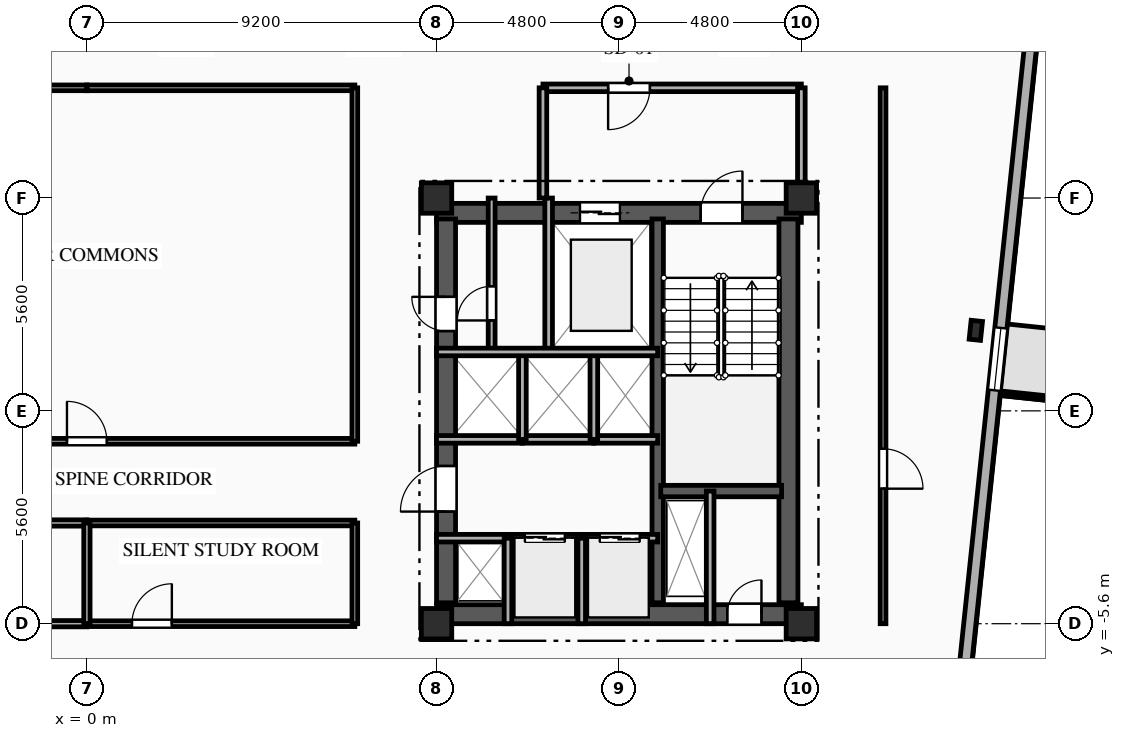
"""IFC4 building model, lengths in metres.
Left out: names, types, materials, properties, quantities, classifications, styles, units other than length and angle.
Written with IfcOpenShell. Run it as: python <this file> out.ifc"""

import sys

from ifc_helpers import new_model, si_unit, direction, frame, frame_2d, origin, origin_2d, place, context, subcontext, project, spatial, rectangle, i_section, extrude, element, fill, save


model = new_model("IFC4")
c1 = context("Model", 3, precision=1e-05, world=origin(), true_north=direction((0.0, 1.0)))
c2 = subcontext(c1, "Body", "Model", "MODEL_VIEW")
j1 = project(units=[si_unit("LENGTHUNIT", "METRE"), si_unit("PLANEANGLEUNIT", "RADIAN")], contexts=[c1])
p1 = place(None, origin())
s1 = spatial("IfcSite", under=j1, at=p1, CompositionType="ELEMENT")
p2 = place(p1, origin())
s2 = spatial("IfcBuilding", under=s1, at=p2, CompositionType="ELEMENT")
p3 = place(p2, frame((0.0, 0.0, 183.0)))
s3 = spatial("IfcBuildingStorey", under=s2, at=p3, CompositionType="ELEMENT", Elevation=183.0)
for number, where, z_axis, x_axis in (
    (1, (9.2, -5.6, 0.0), (0.0, 0.0, 1.0), (1.0, 0.0, 0.0)),
    (2, (9.2, 5.6, 0.0), (0.0, 0.0, 1.0), (1.0, 0.0, 0.0)),
    (3, (18.8, -5.6, 0.0), (0.0, 0.0, 1.0), (1.0, 0.0, 0.0)),
    (4, (18.8, 5.6, 0.0), (0.0, 0.0, 1.0), (1.0, 0.0, 0.0)),
):
    element("IfcColumn", number, at=place(p3, frame(where, z_axis=z_axis, x_axis=x_axis)), inside=s3, PredefinedType="COLUMN", context=c2, shape_type="SweptSolid", body=[
        extrude(rectangle(XDim=0.8, YDim=0.8, at=origin_2d()), origin(), (0.0, 0.0, 1.0), 3.35),
    ])
p4 = place(p3, frame((23.391, 2.119, 0.0), z_axis=(0.0, 0.0, 1.0), x_axis=(0.994521895368, -0.104528463268, 0.0)))
e5 = element("IfcColumn", 5, at=p4, inside=s3, PredefinedType="COLUMN", context=c2, shape_type="SweptSolid", body=[
    extrude(i_section(OverallWidth=0.3, OverallDepth=0.5, WebThickness=0.014, FlangeThickness=0.028, FilletRadius=0.027, at=origin_2d()), origin(), (0.0, 0.0, 1.0), 3.35),
])
p5 = place(p3, frame((25.063, 11.814, 0.0), z_axis=(0.0, 0.0, 1.0), x_axis=(-0.104523275986, -0.99452244056, 0.0)))
e6 = element("IfcWall", 6, at=p5, inside=s3, PredefinedType="SOLIDWALL", context=c2, shape_type="SweptSolid", body=[
    extrude(rectangle(XDim=28.8, YDim=0.32, at=frame_2d((14.4, 0.0))), origin(), (0.0, 0.0, 1.0), 3.04),
])
p6 = place(p5, frame((9.684, 0.0, 0.85)))
e7 = element("IfcOpeningElement", 7, at=p6, cuts=e6, PredefinedType="OPENING", context=c2, shape_type="SweptSolid", body=[
    extrude(rectangle(XDim=1.65, YDim=1.85, at=frame_2d((0.825, 0.925))), frame((0.0, 0.17, 0.0), z_axis=(0.0, -1.0, 0.0), x_axis=(1.0, 0.0, 0.0)), (0.0, 0.0, 1.0), 0.34),
])
p7 = place(p3, frame((9.2, 5.21, 0.0), z_axis=(0.0, 0.0, 1.0), x_axis=(1.0, 0.0, 0.0)))
e8 = element("IfcWall", 8, at=p7, inside=s3, PredefinedType="SHEAR", context=c2, shape_type="SweptSolid", body=[
    extrude(rectangle(XDim=9.6, YDim=0.5, at=frame_2d((4.8, 0.0))), origin(), (0.0, 0.0, 1.0), 3.04),
])
p8 = place(p7, frame((6.95, 0.0, 0.0)))
e9 = element("IfcOpeningElement", 9, at=p8, cuts=e8, PredefinedType="OPENING", context=c2, shape_type="SweptSolid", body=[
    extrude(rectangle(XDim=1.1, YDim=2.15, at=frame_2d((0.55, 1.075))), frame((0.0, 0.26, 0.0), z_axis=(0.0, -1.0, 0.0), x_axis=(1.0, 0.0, 0.0)), (0.0, 0.0, 1.0), 0.52),
])
p9 = place(p7, frame((3.775, 0.0, 0.0)))
e10 = element("IfcOpeningElement", 10, at=p9, cuts=e8, PredefinedType="OPENING", context=c2, shape_type="SweptSolid", body=[
    extrude(rectangle(XDim=1.05, YDim=2.1, at=frame_2d((0.525, 1.05))), frame((0.0, 0.26, 0.0), z_axis=(0.0, -1.0, 0.0), x_axis=(1.0, 0.0, 0.0)), (0.0, 0.0, 1.0), 0.52),
])
p10 = place(p3, frame((9.2, -5.35, 0.0), z_axis=(0.0, 0.0, 1.0), x_axis=(1.0, 0.0, 0.0)))
e11 = element("IfcWall", 11, at=p10, inside=s3, PredefinedType="SHEAR", context=c2, shape_type="SweptSolid", body=[
    extrude(rectangle(XDim=9.6, YDim=0.5, at=frame_2d((4.8, 0.0))), origin(), (0.0, 0.0, 1.0), 3.04),
])
p11 = place(p10, frame((7.65, 0.0, 0.0)))
e12 = element("IfcOpeningElement", 12, at=p11, cuts=e11, PredefinedType="OPENING", context=c2, shape_type="SweptSolid", body=[
    extrude(rectangle(XDim=0.9, YDim=2.1, at=frame_2d((0.45, 1.05))), frame((0.0, 0.26, 0.0), z_axis=(0.0, -1.0, 0.0), x_axis=(1.0, 0.0, 0.0)), (0.0, 0.0, 1.0), 0.52),
])
p12 = place(p3, frame((9.45, -5.05, 0.0), z_axis=(0.0, 0.0, 1.0), x_axis=(0.0, 1.0, 0.0)))
e13 = element("IfcWall", 13, at=p12, inside=s3, PredefinedType="SHEAR", context=c2, shape_type="SweptSolid", body=[
    extrude(rectangle(XDim=10.1, YDim=0.5, at=frame_2d((5.05, 0.0))), origin(), (0.0, 0.0, 1.0), 3.04),
])
p13 = place(p12, frame((7.15, 0.0, 0.0)))
e14 = element("IfcOpeningElement", 14, at=p13, cuts=e13, PredefinedType="OPENING", context=c2, shape_type="SweptSolid", body=[
    extrude(rectangle(XDim=0.9, YDim=2.1, at=frame_2d((0.45, 1.05))), frame((0.0, 0.26, 0.0), z_axis=(0.0, -1.0, 0.0), x_axis=(1.0, 0.0, 0.0)), (0.0, 0.0, 1.0), 0.52),
])
p14 = place(p12, frame((2.4, 0.0, 0.0)))
e15 = element("IfcOpeningElement", 15, at=p14, cuts=e13, PredefinedType="OPENING", context=c2, shape_type="SweptSolid", body=[
    extrude(rectangle(XDim=1.2, YDim=2.15, at=frame_2d((0.6, 1.075))), frame((0.0, 0.26, 0.0), z_axis=(0.0, -1.0, 0.0), x_axis=(1.0, 0.0, 0.0)), (0.0, 0.0, 1.0), 0.52),
])
p15 = place(p3, frame((18.46, -5.05, 0.0), z_axis=(0.0, 0.0, 1.0), x_axis=(0.0, 1.0, 0.0)))
e16 = element("IfcWall", 16, at=p15, inside=s3, PredefinedType="SHEAR", context=c2, shape_type="SweptSolid", body=[
    extrude(rectangle(XDim=10.1, YDim=0.5, at=frame_2d((5.05, 0.0))), origin(), (0.0, 0.0, 1.0), 3.04),
])
p16 = place(p3, frame((15.02, -5.05, 0.0), z_axis=(0.0, 0.0, 1.0), x_axis=(0.0, 1.0, 0.0)))
e17 = element("IfcWall", 17, at=p16, inside=s3, PredefinedType="SHEAR", context=c2, shape_type="SweptSolid", body=[
    extrude(rectangle(XDim=10.1, YDim=0.3, at=frame_2d((5.05, 0.0))), origin(), (0.0, 0.0, 1.0), 3.04),
])
p17 = place(p3, frame((15.1, -2.11, 0.0), z_axis=(0.0, 0.0, 1.0), x_axis=(1.0, 0.0, 0.0)))
e18 = element("IfcWall", 18, at=p17, inside=s3, PredefinedType="SHEAR", context=c2, shape_type="SweptSolid", body=[
    extrude(rectangle(XDim=3.18, YDim=0.3, at=frame_2d((1.59, 0.0))), origin(), (0.0, 0.0, 1.0), 3.04),
])
p18 = place(p3, frame((16.4, -2.11, 0.0), z_axis=(0.0, 0.0, 1.0), x_axis=(0.0, -1.0, 0.0)))
e19 = element("IfcWall", 19, at=p18, inside=s3, PredefinedType="PARTITIONING", context=c2, shape_type="SweptSolid", body=[
    extrude(rectangle(XDim=3.49, YDim=0.2, at=frame_2d((1.745, 0.0))), origin(), (0.0, 0.0, 1.0), 3.04),
])
p19 = place(p3, frame((12.15, 5.6, 0.0), z_axis=(0.0, 0.0, 1.0), x_axis=(0.0, -1.0, 0.0)))
e20 = element("IfcWall", 20, at=p19, inside=s3, PredefinedType="PARTITIONING", context=c2, shape_type="SweptSolid", body=[
    extrude(rectangle(XDim=4.05, YDim=0.2, at=frame_2d((2.025, 0.0))), origin(), (0.0, 0.0, 1.0), 3.04),
])
p20 = place(p3, frame((18.8, 8.5, 0.0), z_axis=(0.0, 0.0, 1.0), x_axis=(-1.0, 0.0, 0.0)))
e21 = element("IfcWall", 21, at=p20, inside=s3, PredefinedType="PARTITIONING", context=c2, shape_type="SweptSolid", body=[
    extrude(rectangle(XDim=6.8, YDim=0.2, at=frame_2d((3.4, 0.0))), origin(), (0.0, 0.0, 1.0), 3.04),
])
p21 = place(p20, frame((3.985, 0.0, 0.0)))
e22 = element("IfcOpeningElement", 22, at=p21, cuts=e21, PredefinedType="OPENING", context=c2, shape_type="SweptSolid", body=[
    extrude(rectangle(XDim=1.1, YDim=2.15, at=frame_2d((0.55, 1.075))), frame((0.0, 0.11, 0.0), z_axis=(0.0, -1.0, 0.0), x_axis=(1.0, 0.0, 0.0)), (0.0, 0.0, 1.0), 0.22),
])
p22 = place(p3, frame((18.8, 5.6, 0.0), z_axis=(0.0, 0.0, 1.0), x_axis=(0.0, 1.0, 0.0)))
e23 = element("IfcWall", 23, at=p22, inside=s3, PredefinedType="PARTITIONING", context=c2, shape_type="SweptSolid", body=[
    extrude(rectangle(XDim=2.9, YDim=0.2, at=frame_2d((1.45, 0.0))), origin(), (0.0, 0.0, 1.0), 2.665),
])
p23 = place(p3, frame((12.0, 8.5, 0.0), z_axis=(0.0, 0.0, 1.0), x_axis=(0.0, -1.0, 0.0)))
e24 = element("IfcWall", 24, at=p23, inside=s3, PredefinedType="PARTITIONING", context=c2, shape_type="SweptSolid", body=[
    extrude(rectangle(XDim=2.9, YDim=0.2, at=frame_2d((1.45, 0.0))), origin(), (0.0, 0.0, 1.0), 3.04),
])
p24 = place(p3, frame((10.65, 1.55, 0.0), z_axis=(0.0, 0.0, 1.0), x_axis=(0.0, 1.0, 0.0)))
e25 = element("IfcWall", 25, at=p24, inside=s3, PredefinedType="PARTITIONING", context=c2, shape_type="SweptSolid", body=[
    extrude(rectangle(XDim=4.05, YDim=0.18, at=frame_2d((2.025, 0.0))), origin(), (0.0, 0.0, 1.0), 3.04),
])
p25 = place(p24, frame((0.829, 0.0, 0.0)))
e26 = element("IfcOpeningElement", 26, at=p25, cuts=e25, PredefinedType="OPENING", context=c2, shape_type="SweptSolid", body=[
    extrude(rectangle(XDim=0.9, YDim=2.1, at=frame_2d((0.45, 1.05))), frame((0.0, 0.1, 0.0), z_axis=(0.0, -1.0, 0.0), x_axis=(1.0, 0.0, 0.0)), (0.0, 0.0, 1.0), 0.2),
])
p26 = place(p3, frame((9.2, -3.35, 0.0), z_axis=(0.0, 0.0, 1.0), x_axis=(1.0, 0.0, 0.0)))
e27 = element("IfcWall", 27, at=p26, inside=s3, PredefinedType="PARTITIONING", context=c2, shape_type="SweptSolid", body=[
    extrude(rectangle(XDim=1.88, YDim=0.2, at=frame_2d((0.94, 0.0))), origin(), (0.0, 0.0, 1.0), 2.755),
])
p27 = place(p3, frame((11.08, -3.35, 0.0), z_axis=(0.0, 0.0, 1.0), x_axis=(1.0, 0.0, 0.0)))
e28 = element("IfcWall", 28, at=p27, inside=s3, PredefinedType="PARTITIONING", context=c2, shape_type="SweptSolid", body=[
    extrude(rectangle(XDim=1.94, YDim=0.2, at=frame_2d((0.97, 0.0))), origin(), (0.0, 0.0, 1.0), 3.04),
])
p28 = place(p27, frame((0.445, 0.0, 0.0)))
e29 = element("IfcOpeningElement", 29, at=p28, cuts=e28, PredefinedType="OPENING", context=c2, shape_type="SweptSolid", body=[
    extrude(rectangle(XDim=1.05, YDim=2.1, at=frame_2d((0.525, 1.05))), frame((0.0, 0.11, 0.0), z_axis=(0.0, -1.0, 0.0), x_axis=(1.0, 0.0, 0.0)), (0.0, 0.0, 1.0), 0.22),
])
p29 = place(p3, frame((13.02, -3.35, 0.0), z_axis=(0.0, 0.0, 1.0), x_axis=(1.0, 0.0, 0.0)))
e30 = element("IfcWall", 30, at=p29, inside=s3, PredefinedType="PARTITIONING", context=c2, shape_type="SweptSolid", body=[
    extrude(rectangle(XDim=2.0, YDim=0.2, at=frame_2d((1.0, 0.0))), origin(), (0.0, 0.0, 1.0), 3.04),
])
p30 = place(p29, frame((0.475, 0.0, 0.0)))
e31 = element("IfcOpeningElement", 31, at=p30, cuts=e30, PredefinedType="OPENING", context=c2, shape_type="SweptSolid", body=[
    extrude(rectangle(XDim=1.05, YDim=2.1, at=frame_2d((0.525, 1.05))), frame((0.0, 0.11, 0.0), z_axis=(0.0, -1.0, 0.0), x_axis=(1.0, 0.0, 0.0)), (0.0, 0.0, 1.0), 0.22),
])
p31 = place(p3, frame((11.46, -0.75, 0.0), z_axis=(0.0, 0.0, 1.0), x_axis=(-1.0, 0.0, 0.0)))
e32 = element("IfcWall", 32, at=p31, inside=s3, PredefinedType="PARTITIONING", context=c2, shape_type="SweptSolid", body=[
    extrude(rectangle(XDim=2.26, YDim=0.2, at=frame_2d((1.13, 0.0))), origin(), (0.0, 0.0, 1.0), 3.04),
])
p32 = place(p3, frame((13.34, -0.75, 0.0), z_axis=(0.0, 0.0, 1.0), x_axis=(-1.0, 0.0, 0.0)))
e33 = element("IfcWall", 33, at=p32, inside=s3, PredefinedType="PARTITIONING", context=c2, shape_type="SweptSolid", body=[
    extrude(rectangle(XDim=1.88, YDim=0.2, at=frame_2d((0.94, 0.0))), origin(), (0.0, 0.0, 1.0), 3.04),
])
p33 = place(p3, frame((15.02, -0.75, 0.0), z_axis=(0.0, 0.0, 1.0), x_axis=(-1.0, 0.0, 0.0)))
e34 = element("IfcWall", 34, at=p33, inside=s3, PredefinedType="PARTITIONING", context=c2, shape_type="SweptSolid", body=[
    extrude(rectangle(XDim=1.68, YDim=0.2, at=frame_2d((0.84, 0.0))), origin(), (0.0, 0.0, 1.0), 3.04),
])
for number, where, z_axis, x_axis in (
    (35, (11.08, -5.6, 0.0), (0.0, 0.0, 1.0), (0.0, 1.0, 0.0)),
    (36, (13.02, -5.6, 0.0), (0.0, 0.0, 1.0), (0.0, 1.0, 0.0)),
):
    element("IfcWall", number, at=place(p3, frame(where, z_axis=z_axis, x_axis=x_axis)), inside=s3, PredefinedType="PARTITIONING", context=c2, shape_type="SweptSolid", body=[
        extrude(rectangle(XDim=2.25, YDim=0.2, at=frame_2d((1.125, 0.0))), origin(), (0.0, 0.0, 1.0), 3.04),
    ])
for number, where, z_axis, x_axis in (
    (37, (11.46, -0.75, 0.0), (0.0, 0.0, 1.0), (0.0, 1.0, 0.0)),
    (38, (13.34, -0.75, 0.0), (0.0, 0.0, 1.0), (0.0, 1.0, 0.0)),
):
    element("IfcWall", number, at=place(p3, frame(where, z_axis=z_axis, x_axis=x_axis)), inside=s3, PredefinedType="PARTITIONING", context=c2, shape_type="SweptSolid", body=[
        extrude(rectangle(XDim=2.3, YDim=0.2, at=frame_2d((1.15, 0.0))), origin(), (0.0, 0.0, 1.0), 3.04),
    ])
for number, where, z_axis, x_axis in (
    (39, (0.0, 8.5, 0.0), (0.0, 0.0, 1.0), (-1.0, 0.0, 0.0)),
    (40, (7.05, 8.5, 0.0), (0.0, 0.0, 1.0), (-1.0, 0.0, 0.0)),
):
    element("IfcWall", number, at=place(p3, frame(where, z_axis=z_axis, x_axis=x_axis)), inside=s3, PredefinedType="PARTITIONING", context=c2, shape_type="SweptSolid", body=[
        extrude(rectangle(XDim=7.05, YDim=0.15, at=frame_2d((3.525, 0.0))), origin(), (0.0, 0.0, 1.0), 3.04),
    ])
p34 = place(p3, frame((-7.05, -5.6, 0.0), z_axis=(0.0, 0.0, 1.0), x_axis=(1.0, 0.0, 0.0)))
e41 = element("IfcWall", 41, at=p34, inside=s3, PredefinedType="PARTITIONING", context=c2, shape_type="SweptSolid", body=[
    extrude(rectangle(XDim=7.05, YDim=0.165, at=frame_2d((3.525, 0.0))), origin(), (0.0, 0.0, 1.0), 2.525),
])
p35 = place(p34, frame((4.728, 0.0, 0.0)))
e42 = element("IfcOpeningElement", 42, at=p35, cuts=e41, PredefinedType="OPENING", context=c2, shape_type="SweptSolid", body=[
    extrude(rectangle(XDim=1.15, YDim=2.15, at=frame_2d((0.575, 1.075))), frame((0.0, 0.093, 0.0), z_axis=(0.0, -1.0, 0.0), x_axis=(1.0, 0.0, 0.0)), (0.0, 0.0, 1.0), 0.185),
])
p36 = place(p3, frame((0.0, -5.6, 0.0), z_axis=(0.0, 0.0, 1.0), x_axis=(1.0, 0.0, 0.0)))
e43 = element("IfcWall", 43, at=p36, inside=s3, PredefinedType="PARTITIONING", context=c2, shape_type="SweptSolid", body=[
    extrude(rectangle(XDim=7.05, YDim=0.15, at=frame_2d((3.525, 0.0))), origin(), (0.0, 0.0, 1.0), 2.525),
])
p37 = place(p36, frame((1.185, 0.0, 0.0)))
e44 = element("IfcOpeningElement", 44, at=p37, cuts=e43, PredefinedType="OPENING", context=c2, shape_type="SweptSolid", body=[
    extrude(rectangle(XDim=1.05, YDim=2.15, at=frame_2d((0.525, 1.075))), frame((0.0, 0.085, 0.0), z_axis=(0.0, -1.0, 0.0), x_axis=(1.0, 0.0, 0.0)), (0.0, 0.0, 1.0), 0.17),
])
p38 = place(p3, frame((20.95, 8.5, 0.0), z_axis=(0.0, 0.0, 1.0), x_axis=(0.0, -1.0, 0.0)))
e45 = element("IfcWall", 45, at=p38, inside=s3, PredefinedType="PARTITIONING", context=c2, shape_type="SweptSolid", body=[
    extrude(rectangle(XDim=14.1, YDim=0.15, at=frame_2d((7.05, 0.0))), origin(), (0.0, 0.0, 1.0), 2.695),
])
p39 = place(p38, frame((9.498, 0.0, 0.0)))
e46 = element("IfcOpeningElement", 46, at=p39, cuts=e45, PredefinedType="OPENING", context=c2, shape_type="SweptSolid", body=[
    extrude(rectangle(XDim=1.05, YDim=2.15, at=frame_2d((0.525, 1.075))), frame((0.0, 0.085, 0.0), z_axis=(0.0, -1.0, 0.0), x_axis=(1.0, 0.0, 0.0)), (0.0, 0.0, 1.0), 0.17),
])
p40 = place(p3, frame((-7.05, -0.8, 0.0), z_axis=(0.0, 0.0, 1.0), x_axis=(1.0, 0.0, 0.0)))
e47 = element("IfcWall", 47, at=p40, inside=s3, PredefinedType="PARTITIONING", context=c2, shape_type="SweptSolid", body=[
    extrude(rectangle(XDim=14.1, YDim=0.15, at=frame_2d((7.05, 0.0))), origin(), (0.0, 0.0, 1.0), 3.04),
])
p41 = place(p40, frame((6.525, 0.0, 0.0)))
e48 = element("IfcOpeningElement", 48, at=p41, cuts=e47, PredefinedType="OPENING", context=c2, shape_type="SweptSolid", body=[
    extrude(rectangle(XDim=1.05, YDim=2.15, at=frame_2d((0.525, 1.075))), frame((0.0, 0.085, 0.0), z_axis=(0.0, -1.0, 0.0), x_axis=(1.0, 0.0, 0.0)), (0.0, 0.0, 1.0), 0.17),
])
p42 = place(p3, frame((0.0, -2.95, 0.0), z_axis=(0.0, 0.0, 1.0), x_axis=(-1.0, 0.0, 0.0)))
e49 = element("IfcWall", 49, at=p42, inside=s3, PredefinedType="PARTITIONING", context=c2, shape_type="SweptSolid", body=[
    extrude(rectangle(XDim=7.05, YDim=0.165, at=frame_2d((3.525, 0.0))), origin(), (0.0, 0.0, 1.0), 3.04),
])
p43 = place(p3, frame((7.05, -2.95, 0.0), z_axis=(0.0, 0.0, 1.0), x_axis=(-1.0, 0.0, 0.0)))
e50 = element("IfcWall", 50, at=p43, inside=s3, PredefinedType="PARTITIONING", context=c2, shape_type="SweptSolid", body=[
    extrude(rectangle(XDim=7.05, YDim=0.15, at=frame_2d((3.525, 0.0))), origin(), (0.0, 0.0, 1.0), 3.04),
])
p44 = place(p3, frame((7.05, -0.8, 0.0), z_axis=(0.0, 0.0, 1.0), x_axis=(0.0, 1.0, 0.0)))
e51 = element("IfcWall", 51, at=p44, inside=s3, PredefinedType="PARTITIONING", context=c2, shape_type="SweptSolid", body=[
    extrude(rectangle(XDim=9.3, YDim=0.15, at=frame_2d((4.65, 0.0))), origin(), (0.0, 0.0, 1.0), 3.04),
])
p45 = place(p3, frame((7.05, -5.6, 0.0), z_axis=(0.0, 0.0, 1.0), x_axis=(0.0, 1.0, 0.0)))
e52 = element("IfcWall", 52, at=p45, inside=s3, PredefinedType="PARTITIONING", context=c2, shape_type="SweptSolid", body=[
    extrude(rectangle(XDim=2.65, YDim=0.15, at=frame_2d((1.325, 0.0))), origin(), (0.0, 0.0, 1.0), 3.04),
])
p46 = place(p3, frame((0.0, -2.95, 0.0), z_axis=(0.0, 0.0, 1.0), x_axis=(0.0, -1.0, 0.0)))
e53 = element("IfcWall", 53, at=p46, inside=s3, PredefinedType="PARTITIONING", context=c2, shape_type="SweptSolid", body=[
    extrude(rectangle(XDim=2.65, YDim=0.165, at=frame_2d((1.325, 0.0))), origin(), (0.0, 0.0, 1.0), 3.04),
])
p47 = place(p3, frame((9.2, 1.55, 0.0), z_axis=(0.0, 0.0, 1.0), x_axis=(1.0, 0.0, 0.0)))
e54 = element("IfcWall", 54, at=p47, inside=s3, PredefinedType="PARTITIONING", context=c2, shape_type="SweptSolid", body=[
    extrude(rectangle(XDim=5.82, YDim=0.2, at=frame_2d((2.91, 0.0))), origin(), (0.0, 0.0, 1.0), 3.04),
])
p48 = place(p6, origin())
e55 = element("IfcWindow", 55, at=p48, inside=s3, PartitioningType="SINGLE_PANEL", PredefinedType="WINDOW", context=c2, shape_type="SweptSolid", body=[
    extrude(rectangle(XDim=1.65, YDim=1.85, at=frame_2d((0.825, 0.925))), frame((0.0, 0.03, 0.0), z_axis=(0.0, -1.0, 0.0), x_axis=(1.0, 0.0, 0.0)), (0.0, 0.0, 1.0), 0.06),
])
fill(e7, e55)
p49 = place(p8, origin())
e56 = element("IfcDoor", 56, at=p49, inside=s3, OperationType="SINGLE_SWING_RIGHT", PredefinedType="DOOR", context=c2, shape_type="SweptSolid", body=[
    extrude(rectangle(XDim=1.1, YDim=2.15, at=frame_2d((0.55, 1.075))), frame((0.0, 0.025, 0.0), z_axis=(0.0, -1.0, 0.0), x_axis=(1.0, 0.0, 0.0)), (0.0, 0.0, 1.0), 0.05),
])
fill(e9, e56)
p50 = place(p9, origin())
e57 = element("IfcDoor", 57, at=p50, inside=s3, OperationType="DOUBLE_DOOR_SLIDING", PredefinedType="DOOR", context=c2, shape_type="SweptSolid", body=[
    extrude(rectangle(XDim=1.05, YDim=2.1, at=frame_2d((0.525, 1.05))), frame((0.0, 0.025, 0.0), z_axis=(0.0, -1.0, 0.0), x_axis=(1.0, 0.0, 0.0)), (0.0, 0.0, 1.0), 0.05),
])
fill(e10, e57)
p51 = place(p11, origin())
e58 = element("IfcDoor", 58, at=p51, inside=s3, OperationType="SINGLE_SWING_RIGHT", PredefinedType="DOOR", context=c2, shape_type="SweptSolid", body=[
    extrude(rectangle(XDim=0.9, YDim=2.1, at=frame_2d((0.45, 1.05))), frame((0.0, 0.025, 0.0), z_axis=(0.0, -1.0, 0.0), x_axis=(1.0, 0.0, 0.0)), (0.0, 0.0, 1.0), 0.05),
])
fill(e12, e58)
p52 = place(p21, origin())
e59 = element("IfcDoor", 59, at=p52, inside=s3, OperationType="SINGLE_SWING_RIGHT", PredefinedType="DOOR", context=c2, shape_type="SweptSolid", body=[
    extrude(rectangle(XDim=1.1, YDim=2.15, at=frame_2d((0.55, 1.075))), frame((0.0, 0.025, 0.0), z_axis=(0.0, -1.0, 0.0), x_axis=(1.0, 0.0, 0.0)), (0.0, 0.0, 1.0), 0.05),
])
fill(e22, e59)
p53 = place(p25, origin())
e60 = element("IfcDoor", 60, at=p53, inside=s3, OperationType="SINGLE_SWING_LEFT", PredefinedType="DOOR", context=c2, shape_type="SweptSolid", body=[
    extrude(rectangle(XDim=0.9, YDim=2.1, at=frame_2d((0.45, 1.05))), frame((0.0, 0.025, 0.0), z_axis=(0.0, -1.0, 0.0), x_axis=(1.0, 0.0, 0.0)), (0.0, 0.0, 1.0), 0.05),
])
fill(e26, e60)
p54 = place(p13, origin())
e61 = element("IfcDoor", 61, at=p54, inside=s3, OperationType="SINGLE_SWING_RIGHT", PredefinedType="DOOR", context=c2, shape_type="SweptSolid", body=[
    extrude(rectangle(XDim=0.9, YDim=2.1, at=frame_2d((0.45, 1.05))), frame((0.0, 0.025, 0.0), z_axis=(0.0, -1.0, 0.0), x_axis=(1.0, 0.0, 0.0)), (0.0, 0.0, 1.0), 0.05),
])
fill(e14, e61)
p55 = place(p28, origin())
e62 = element("IfcDoor", 62, at=p55, inside=s3, OperationType="DOUBLE_DOOR_SLIDING", PredefinedType="DOOR", context=c2, shape_type="SweptSolid", body=[
    extrude(rectangle(XDim=1.05, YDim=2.1, at=frame_2d((0.525, 1.05))), frame((0.0, 0.025, 0.0), z_axis=(0.0, -1.0, 0.0), x_axis=(1.0, 0.0, 0.0)), (0.0, 0.0, 1.0), 0.05),
])
fill(e29, e62)
p56 = place(p30, origin())
e63 = element("IfcDoor", 63, at=p56, inside=s3, OperationType="DOUBLE_DOOR_SLIDING", PredefinedType="DOOR", context=c2, shape_type="SweptSolid", body=[
    extrude(rectangle(XDim=1.05, YDim=2.1, at=frame_2d((0.525, 1.05))), frame((0.0, 0.025, 0.0), z_axis=(0.0, -1.0, 0.0), x_axis=(1.0, 0.0, 0.0)), (0.0, 0.0, 1.0), 0.05),
])
fill(e31, e63)
p57 = place(p14, origin())
e64 = element("IfcDoor", 64, at=p57, inside=s3, OperationType="SINGLE_SWING_LEFT", PredefinedType="DOOR", context=c2, shape_type="SweptSolid", body=[
    extrude(rectangle(XDim=1.2, YDim=2.15, at=frame_2d((0.6, 1.075))), frame((0.0, 0.025, 0.0), z_axis=(0.0, -1.0, 0.0), x_axis=(1.0, 0.0, 0.0)), (0.0, 0.0, 1.0), 0.05),
])
fill(e15, e64)
p58 = place(p37, origin())
e65 = element("IfcDoor", 65, at=p58, inside=s3, OperationType="SINGLE_SWING_RIGHT", PredefinedType="DOOR", context=c2, shape_type="SweptSolid", body=[
    extrude(rectangle(XDim=1.05, YDim=2.15, at=frame_2d((0.525, 1.075))), frame((0.0, 0.025, 0.0), z_axis=(0.0, -1.0, 0.0), x_axis=(1.0, 0.0, 0.0)), (0.0, 0.0, 1.0), 0.05),
])
fill(e44, e65)
p59 = place(p39, origin())
e66 = element("IfcDoor", 66, at=p59, inside=s3, OperationType="SINGLE_SWING_RIGHT", PredefinedType="DOOR", context=c2, shape_type="SweptSolid", body=[
    extrude(rectangle(XDim=1.05, YDim=2.15, at=frame_2d((0.525, 1.075))), frame((0.0, 0.025, 0.0), z_axis=(0.0, -1.0, 0.0), x_axis=(1.0, 0.0, 0.0)), (0.0, 0.0, 1.0), 0.05),
])
fill(e46, e66)
p60 = place(p41, origin())
e67 = element("IfcDoor", 67, at=p60, inside=s3, OperationType="SINGLE_SWING_LEFT", PredefinedType="DOOR", context=c2, shape_type="SweptSolid", body=[
    extrude(rectangle(XDim=1.05, YDim=2.15, at=frame_2d((0.525, 1.075))), frame((0.0, 0.025, 0.0), z_axis=(0.0, -1.0, 0.0), x_axis=(1.0, 0.0, 0.0)), (0.0, 0.0, 1.0), 0.05),
])
fill(e48, e67)
save(model, sys.argv[1])
